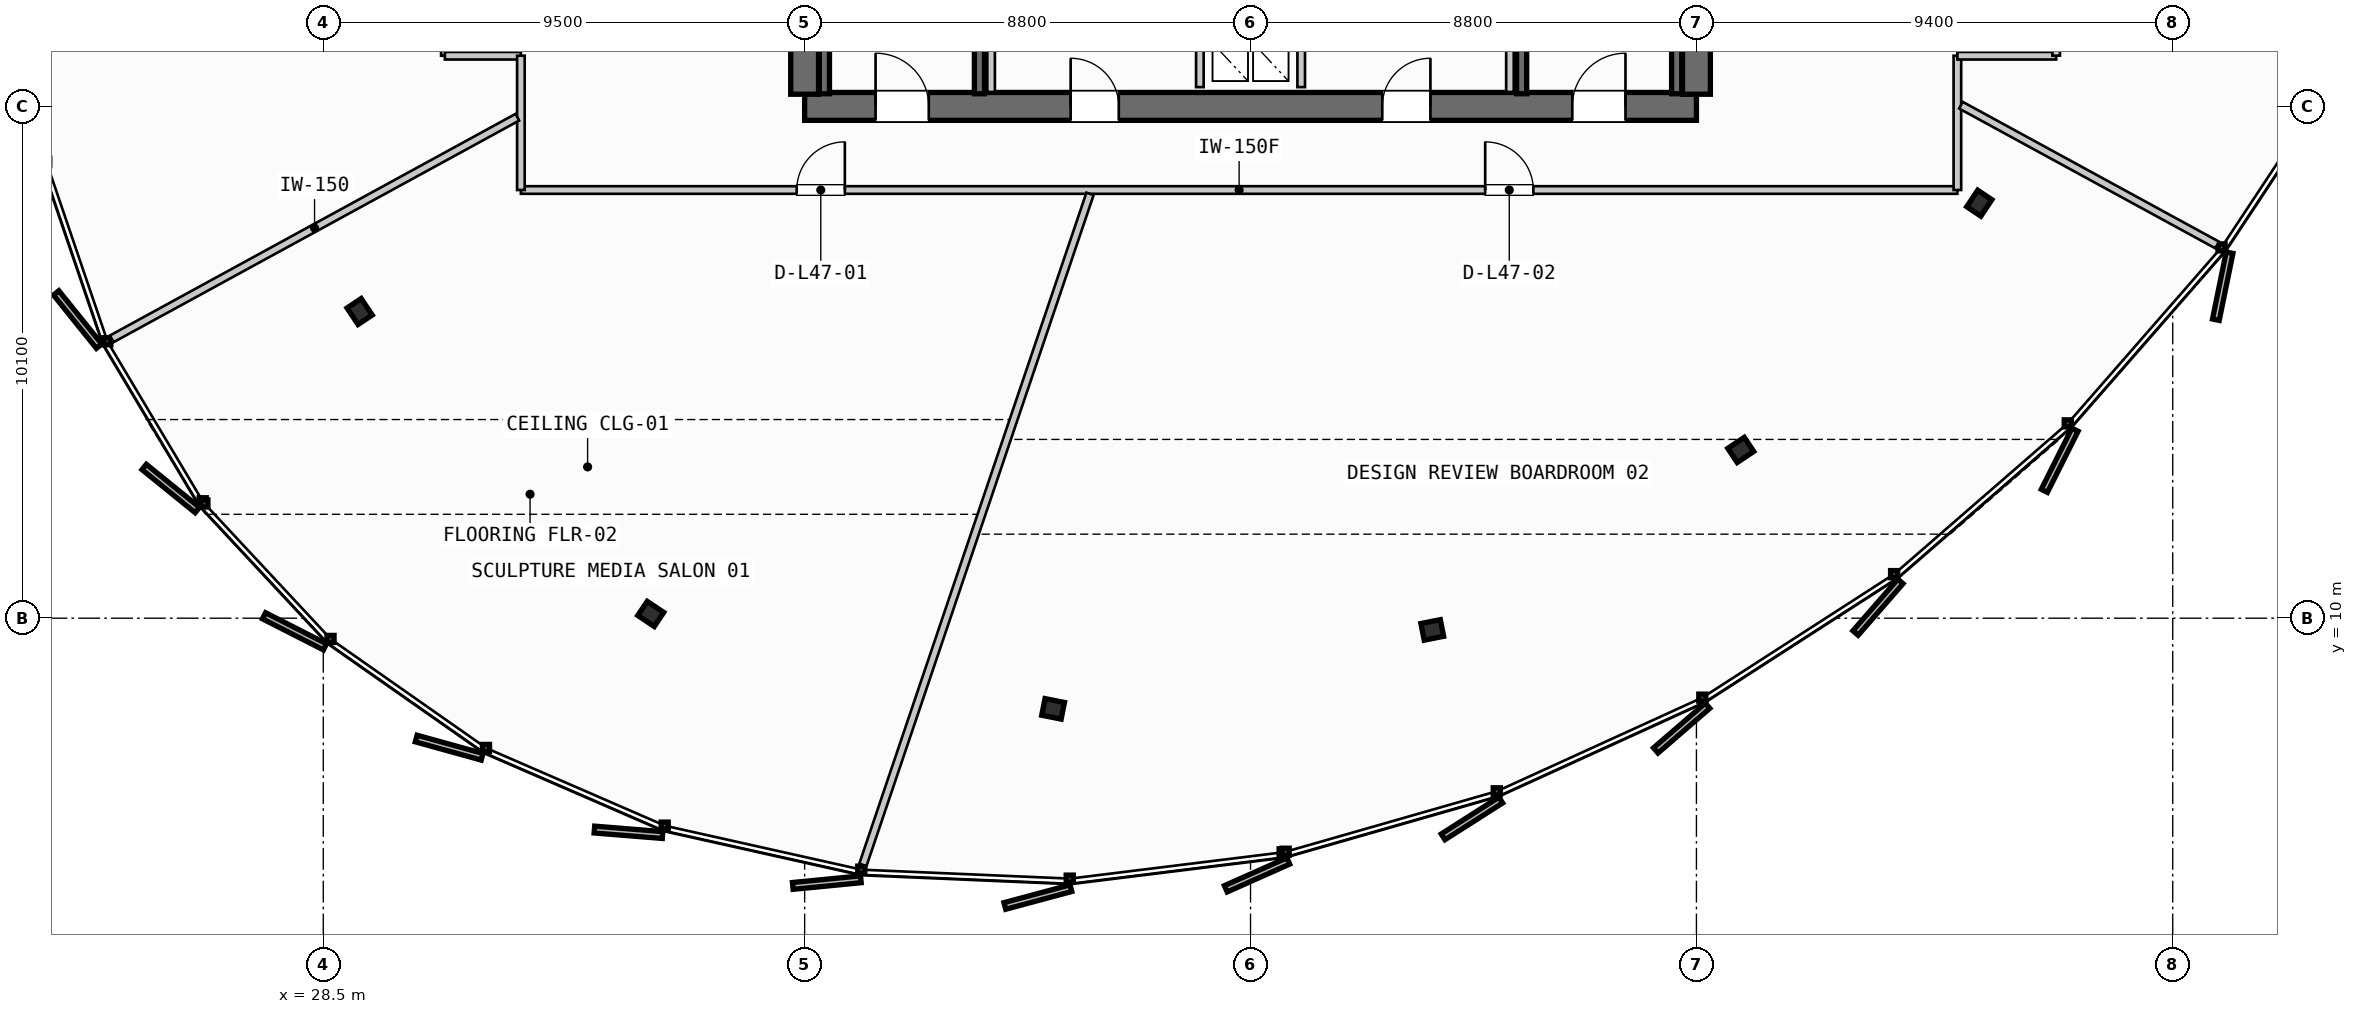
"""IFC4 building model, lengths in metres.
Left out: names, types, materials, properties, quantities, classifications, styles, units other than length and angle.
Written with IfcOpenShell. Run it as: python <this file> out.ifc"""

import sys

from ifc_helpers import new_model, si_unit, direction, frame, frame_2d, origin, origin_2d, place, context, subcontext, project, spatial, rectangle, i_section, extrude, source, transform, mapped, element, fill, save


model = new_model("IFC4")
c1 = context("Model", 3, precision=1e-05, world=origin(), true_north=direction((0.0, 1.0)))
c2 = subcontext(c1, "Body", "Model", "MODEL_VIEW")
j1 = project(units=[si_unit("LENGTHUNIT", "METRE"), si_unit("PLANEANGLEUNIT", "RADIAN")], contexts=[c1])
p1 = place(None, origin())
s1 = spatial("IfcSite", under=j1, at=p1, CompositionType="ELEMENT")
p2 = place(p1, origin())
s2 = spatial("IfcBuilding", under=s1, at=p2, CompositionType="ELEMENT")
p3 = place(p2, frame((0.0, 0.0, 183.4)))
s3 = spatial("IfcBuildingStorey", under=s2, at=p3, CompositionType="ELEMENT", Elevation=183.4)
p4 = place(p3, frame((38.0, 20.1, 0.0), z_axis=(0.0, 0.0, 1.0), x_axis=(1.0, 0.0, 0.0)))
e1 = element("IfcWall", 1, at=p4, inside=s3, PredefinedType="SHEAR", context=c2, shape_type="SweptSolid", body=[
    extrude(rectangle(XDim=17.6, YDim=0.55, at=frame_2d((8.8, 0.0))), origin(), (0.0, 0.0, 1.0), 3.26),
])
p5 = place(p4, frame((1.4, 0.0, 0.0)))
e2 = element("IfcOpeningElement", 2, at=p5, cuts=e1, PredefinedType="OPENING", context=c2, shape_type="SweptSolid", body=[
    extrude(rectangle(XDim=1.05, YDim=2.15, at=frame_2d((0.525, 1.075))), frame((0.0, 0.285, 0.0), z_axis=(0.0, -1.0, 0.0), x_axis=(1.0, 0.0, 0.0)), (0.0, 0.0, 1.0), 0.57),
])
p6 = place(p4, frame((15.15, 0.0, 0.0)))
e3 = element("IfcOpeningElement", 3, at=p6, cuts=e1, PredefinedType="OPENING", context=c2, shape_type="SweptSolid", body=[
    extrude(rectangle(XDim=1.05, YDim=2.15, at=frame_2d((0.525, 1.075))), frame((0.0, 0.285, 0.0), z_axis=(0.0, -1.0, 0.0), x_axis=(1.0, 0.0, 0.0)), (0.0, 0.0, 1.0), 0.57),
])
p7 = place(p4, frame((5.25, 0.0, 0.0)))
e4 = element("IfcOpeningElement", 4, at=p7, cuts=e1, PredefinedType="OPENING", context=c2, shape_type="SweptSolid", body=[
    extrude(rectangle(XDim=0.95, YDim=2.15, at=frame_2d((0.475, 1.075))), frame((0.0, 0.285, 0.0), z_axis=(0.0, -1.0, 0.0), x_axis=(1.0, 0.0, 0.0)), (0.0, 0.0, 1.0), 0.57),
])
p8 = place(p4, frame((11.4, 0.0, 0.0)))
e5 = element("IfcOpeningElement", 5, at=p8, cuts=e1, PredefinedType="OPENING", context=c2, shape_type="SweptSolid", body=[
    extrude(rectangle(XDim=0.95, YDim=2.15, at=frame_2d((0.475, 1.075))), frame((0.0, 0.285, 0.0), z_axis=(0.0, -1.0, 0.0), x_axis=(1.0, 0.0, 0.0)), (0.0, 0.0, 1.0), 0.57),
])
p9 = place(p3, frame((38.0, 35.26, 0.0), z_axis=(0.0, 0.0, 1.0), x_axis=(0.0, -1.0, 0.0)))
e6 = element("IfcWall", 6, at=p9, inside=s3, PredefinedType="SHEAR", context=c2, shape_type="SweptSolid", body=[
    extrude(rectangle(XDim=14.92, YDim=0.55, at=frame_2d((7.46, 0.0))), origin(), (0.0, 0.0, 1.0), 3.26),
])
p10 = place(p9, frame((5.21, 0.0, 0.0)))
e7 = element("IfcOpeningElement", 7, at=p10, cuts=e6, PredefinedType="OPENING", context=c2, shape_type="SweptSolid", body=[
    extrude(rectangle(XDim=1.1, YDim=2.2, at=frame_2d((0.55, 1.1))), frame((0.0, 0.285, 0.0), z_axis=(0.0, -1.0, 0.0), x_axis=(1.0, 0.0, 0.0)), (0.0, 0.0, 1.0), 0.57),
])
p11 = place(p3, frame((55.6, 20.34, 0.0), z_axis=(0.0, 0.0, 1.0), x_axis=(0.0, 1.0, 0.0)))
e8 = element("IfcWall", 8, at=p11, inside=s3, PredefinedType="SHEAR", context=c2, shape_type="SweptSolid", body=[
    extrude(rectangle(XDim=14.92, YDim=0.55, at=frame_2d((7.46, 0.0))), origin(), (0.0, 0.0, 1.0), 3.26),
])
p12 = place(p11, frame((12.71, 0.0, 0.0)))
e9 = element("IfcOpeningElement", 9, at=p12, cuts=e8, PredefinedType="OPENING", context=c2, shape_type="SweptSolid", body=[
    extrude(rectangle(XDim=1.05, YDim=2.15, at=frame_2d((0.525, 1.075))), frame((0.0, 0.285, 0.0), z_axis=(0.0, -1.0, 0.0), x_axis=(1.0, 0.0, 0.0)), (0.0, 0.0, 1.0), 0.57),
])
p13 = place(p11, frame((8.61, 0.0, 0.0)))
e10 = element("IfcOpeningElement", 10, at=p13, cuts=e8, PredefinedType="OPENING", context=c2, shape_type="SweptSolid", body=[
    extrude(rectangle(XDim=1.1, YDim=2.2, at=frame_2d((0.55, 1.1))), frame((0.0, 0.285, 0.0), z_axis=(0.0, -1.0, 0.0), x_axis=(1.0, 0.0, 0.0)), (0.0, 0.0, 1.0), 0.57),
])
m1 = source(origin(), c2, "Body", "SweptSolid", [
    extrude(i_section(OverallWidth=0.391, OverallDepth=0.335, WebThickness=0.023, FlangeThickness=0.034, FilletRadius=0.015, at=origin_2d()), origin(), (0.0, 0.0, 1.0), 3.26),
])
for number, where, z_axis, x_axis in (
    (11, (29.218, 16.052, 0.0), (0.0, 0.0, 1.0), (-0.831, -0.556, 0.0)),
    (12, (34.963, 10.084, 0.0), (0.0, 0.0, 1.0), (-0.556, -0.831, 0.0)),
    (13, (42.904, 8.211, 0.0), (0.0, 0.0, 1.0), (-0.195, -0.981, 0.0)),
    (14, (50.387, 9.769, 0.0), (0.0, 0.0, 1.0), (0.195, -0.981, 0.0)),
    (15, (56.475, 13.321, 0.0), (0.0, 0.0, 1.0), (0.556, -0.831, 0.0)),
    (16, (61.183, 18.19, 0.0), (0.0, 0.0, 1.0), (0.831, -0.556, 0.0)),
):
    element("IfcColumn", number, at=place(p3, frame(where, z_axis=z_axis, x_axis=x_axis)), inside=s3, PredefinedType="COLUMN", context=c2, shape_type="MappedRepresentation", body=[
        mapped(m1, transform((0.0, 0.0, 0.0), scale=1.0)),
    ])
for number, where, z_axis, x_axis in (
    (17, (41.45, 27.7, 0.0), (0.0, 0.0, 1.0), (0.0, -1.0, 0.0)),
    (18, (38.39, 20.35, 0.0), (0.0, 0.0, 1.0), (0.0, 1.0, 0.0)),
    (19, (55.21, 27.7, 0.0), (0.0, 0.0, 1.0), (0.0, -1.0, 0.0)),
    (20, (52.15, 20.35, 0.0), (0.0, 0.0, 1.0), (0.0, 1.0, 0.0)),
):
    element("IfcWall", number, at=place(p3, frame(where, z_axis=z_axis, x_axis=x_axis)), inside=s3, PredefinedType="SHEAR", context=c2, shape_type="SweptSolid", body=[
        extrude(rectangle(XDim=7.35, YDim=0.2, at=frame_2d((3.675, 0.0))), origin(), (0.0, 0.0, 1.0), 3.26),
    ])
for number, where, z_axis, x_axis in (
    (21, (45.8, 20.48, 0.0), (0.0, 0.0, 1.0), (0.0, 1.0, 0.0)),
    (22, (47.8, 20.48, 0.0), (0.0, 0.0, 1.0), (0.0, 1.0, 0.0)),
):
    element("IfcWall", number, at=place(p3, frame(where, z_axis=z_axis, x_axis=x_axis)), inside=s3, PredefinedType="PARTITIONING", context=c2, shape_type="SweptSolid", body=[
        extrude(rectangle(XDim=2.24, YDim=0.15, at=frame_2d((1.12, 0.0))), origin(), (0.0, 0.0, 1.0), 2.28),
    ])
for number, where, z_axis, x_axis in (
    (23, (41.68, 20.385, 0.0), (0.0, 0.0, 1.0), (0.0, 1.0, 0.0)),
    (24, (51.92, 20.385, 0.0), (0.0, 0.0, 1.0), (0.0, 1.0, 0.0)),
):
    element("IfcWall", number, at=place(p3, frame(where, z_axis=z_axis, x_axis=x_axis)), inside=s3, PredefinedType="PARTITIONING", context=c2, shape_type="SweptSolid", body=[
        extrude(rectangle(XDim=2.345, YDim=0.15, at=frame_2d((1.172, 0.0))), origin(), (0.0, 0.0, 1.0), 2.28),
    ])
p14 = place(p3, frame((32.4, 18.45, 0.0), z_axis=(0.0, 0.0, 1.0), x_axis=(1.0, 0.0, 0.0)))
e25 = element("IfcWall", 25, at=p14, inside=s3, PredefinedType="PARTITIONING", context=c2, shape_type="SweptSolid", body=[
    extrude(rectangle(XDim=28.35, YDim=0.15, at=frame_2d((14.175, 0.0))), origin(), (0.0, 0.0, 1.0), 2.28),
])
p15 = place(p14, frame((5.444, 0.0, 0.0)))
e26 = element("IfcOpeningElement", 26, at=p15, cuts=e25, PredefinedType="OPENING", context=c2, shape_type="SweptSolid", body=[
    extrude(rectangle(XDim=0.95, YDim=2.15, at=frame_2d((0.475, 1.075))), frame((0.0, 0.085, 0.0), z_axis=(0.0, -1.0, 0.0), x_axis=(1.0, 0.0, 0.0)), (0.0, 0.0, 1.0), 0.17),
])
p16 = place(p14, frame((19.031, 0.0, 0.0)))
e27 = element("IfcOpeningElement", 27, at=p16, cuts=e25, PredefinedType="OPENING", context=c2, shape_type="SweptSolid", body=[
    extrude(rectangle(XDim=0.95, YDim=2.15, at=frame_2d((0.475, 1.075))), frame((0.0, 0.085, 0.0), z_axis=(0.0, -1.0, 0.0), x_axis=(1.0, 0.0, 0.0)), (0.0, 0.0, 1.0), 0.17),
])
p17 = place(p3, frame((60.75, 18.45, 0.0), z_axis=(0.0, 0.0, 1.0), x_axis=(0.0, 1.0, 0.0)))
e28 = element("IfcWall", 28, at=p17, inside=s3, PredefinedType="PARTITIONING", context=c2, shape_type="SweptSolid", body=[
    extrude(rectangle(XDim=2.65, YDim=0.15, at=frame_2d((1.325, 0.0))), origin(), (0.0, 0.0, 1.0), 2.28),
])
p18 = place(p3, frame((60.75, 21.1, 0.0), z_axis=(0.0, 0.0, 1.0), x_axis=(1.0, 0.0, 0.0)))
e29 = element("IfcWall", 29, at=p18, inside=s3, PredefinedType="PARTITIONING", context=c2, shape_type="SweptSolid", body=[
    extrude(rectangle(XDim=1.95, YDim=0.15, at=frame_2d((0.975, 0.0))), origin(), (0.0, 0.0, 1.0), 2.28),
])
for number, where, z_axis, x_axis in (
    (30, (62.7, 21.1, 0.0), (0.0, 0.0, 1.0), (0.0, 1.0, 0.0)),
    (31, (30.9, 22.8, 0.0), (0.0, 0.0, 1.0), (0.0, -1.0, 0.0)),
):
    element("IfcWall", number, at=place(p3, frame(where, z_axis=z_axis, x_axis=x_axis)), inside=s3, PredefinedType="PARTITIONING", context=c2, shape_type="SweptSolid", body=[
        extrude(rectangle(XDim=1.7, YDim=0.15, at=frame_2d((0.85, 0.0))), origin(), (0.0, 0.0, 1.0), 2.28),
    ])
p19 = place(p3, frame((30.9, 21.1, 0.0), z_axis=(0.0, 0.0, 1.0), x_axis=(1.0, 0.0, 0.0)))
e32 = element("IfcWall", 32, at=p19, inside=s3, PredefinedType="PARTITIONING", context=c2, shape_type="SweptSolid", body=[
    extrude(rectangle(XDim=1.5, YDim=0.15, at=frame_2d((0.75, 0.0))), origin(), (0.0, 0.0, 1.0), 2.28),
])
p20 = place(p3, frame((32.4, 21.1, 0.0), z_axis=(0.0, 0.0, 1.0), x_axis=(0.0, -1.0, 0.0)))
e33 = element("IfcWall", 33, at=p20, inside=s3, PredefinedType="PARTITIONING", context=c2, shape_type="SweptSolid", body=[
    extrude(rectangle(XDim=2.65, YDim=0.15, at=frame_2d((1.325, 0.0))), origin(), (0.0, 0.0, 1.0), 2.28),
])
p21 = place(p3, frame((32.33, 19.886, 0.0), z_axis=(0.0, 0.0, 1.0), x_axis=(-0.877565973966, -0.479455901348, 0.0)))
e34 = element("IfcWall", 34, at=p21, inside=s3, PredefinedType="PARTITIONING", context=c2, shape_type="SweptSolid", body=[
    extrude(rectangle(XDim=9.121, YDim=0.15, at=frame_2d((4.561, 0.0))), origin(), (0.0, 0.0, 1.0), 2.28),
])
p22 = place(p3, frame((43.632, 18.374, 0.0), z_axis=(0.0, 0.0, 1.0), x_axis=(-0.320619796855, -0.947207973924, 0.0)))
e35 = element("IfcWall", 35, at=p22, inside=s3, PredefinedType="PARTITIONING", context=c2, shape_type="SweptSolid", body=[
    extrude(rectangle(XDim=13.98, YDim=0.15, at=frame_2d((6.99, 0.0))), origin(), (0.0, 0.0, 1.0), 2.28),
])
p23 = place(p3, frame((60.82, 20.124, 0.0), z_axis=(0.0, 0.0, 1.0), x_axis=(0.87786316589, -0.478911538776, 0.0)))
e36 = element("IfcWall", 36, at=p23, inside=s3, PredefinedType="PARTITIONING", context=c2, shape_type="SweptSolid", body=[
    extrude(rectangle(XDim=5.759, YDim=0.15, at=frame_2d((2.879, 0.0))), origin(), (0.0, 0.0, 1.0), 2.28),
])
m2 = source(origin(), c2, "Body", "SweptSolid", [
    extrude(rectangle(XDim=1.05, YDim=2.15, at=frame_2d((0.525, 1.075))), frame((0.0, 0.025, 0.0), z_axis=(0.0, -1.0, 0.0), x_axis=(1.0, 0.0, 0.0)), (0.0, 0.0, 1.0), 0.05),
])
p24 = place(p5, origin())
e37 = element("IfcDoor", 37, at=p24, inside=s3, OperationType="SINGLE_SWING_LEFT", PredefinedType="DOOR", context=c2, shape_type="MappedRepresentation", body=[
    mapped(m2, transform((0.0, 0.0, 0.0), scale=1.0)),
])
fill(e2, e37)
p25 = place(p6, origin())
e38 = element("IfcDoor", 38, at=p25, inside=s3, OperationType="SINGLE_SWING_RIGHT", PredefinedType="DOOR", context=c2, shape_type="MappedRepresentation", body=[
    mapped(m2, transform((0.0, 0.0, 0.0), scale=1.0)),
])
fill(e3, e38)
m3 = source(origin(), c2, "Body", "SweptSolid", [
    extrude(rectangle(XDim=0.95, YDim=2.15, at=frame_2d((0.475, 1.075))), frame((0.0, 0.025, 0.0), z_axis=(0.0, -1.0, 0.0), x_axis=(1.0, 0.0, 0.0)), (0.0, 0.0, 1.0), 0.05),
])
p26 = place(p7, origin())
e39 = element("IfcDoor", 39, at=p26, inside=s3, OperationType="SINGLE_SWING_LEFT", PredefinedType="DOOR", context=c2, shape_type="MappedRepresentation", body=[
    mapped(m3, transform((0.0, 0.0, 0.0), scale=1.0)),
])
fill(e4, e39)
p27 = place(p8, origin())
e40 = element("IfcDoor", 40, at=p27, inside=s3, OperationType="SINGLE_SWING_RIGHT", PredefinedType="DOOR", context=c2, shape_type="MappedRepresentation", body=[
    mapped(m3, transform((0.0, 0.0, 0.0), scale=1.0)),
])
fill(e5, e40)
p28 = place(p15, origin())
e41 = element("IfcDoor", 41, at=p28, inside=s3, OperationType="SINGLE_SWING_RIGHT", PredefinedType="DOOR", context=c2, shape_type="MappedRepresentation", body=[
    mapped(m3, transform((0.0, 0.0, 0.0), scale=1.0)),
])
fill(e26, e41)
p29 = place(p16, origin())
e42 = element("IfcDoor", 42, at=p29, inside=s3, OperationType="SINGLE_SWING_LEFT", PredefinedType="DOOR", context=c2, shape_type="MappedRepresentation", body=[
    mapped(m3, transform((0.0, 0.0, 0.0), scale=1.0)),
])
fill(e27, e42)
save(model, sys.argv[1])
